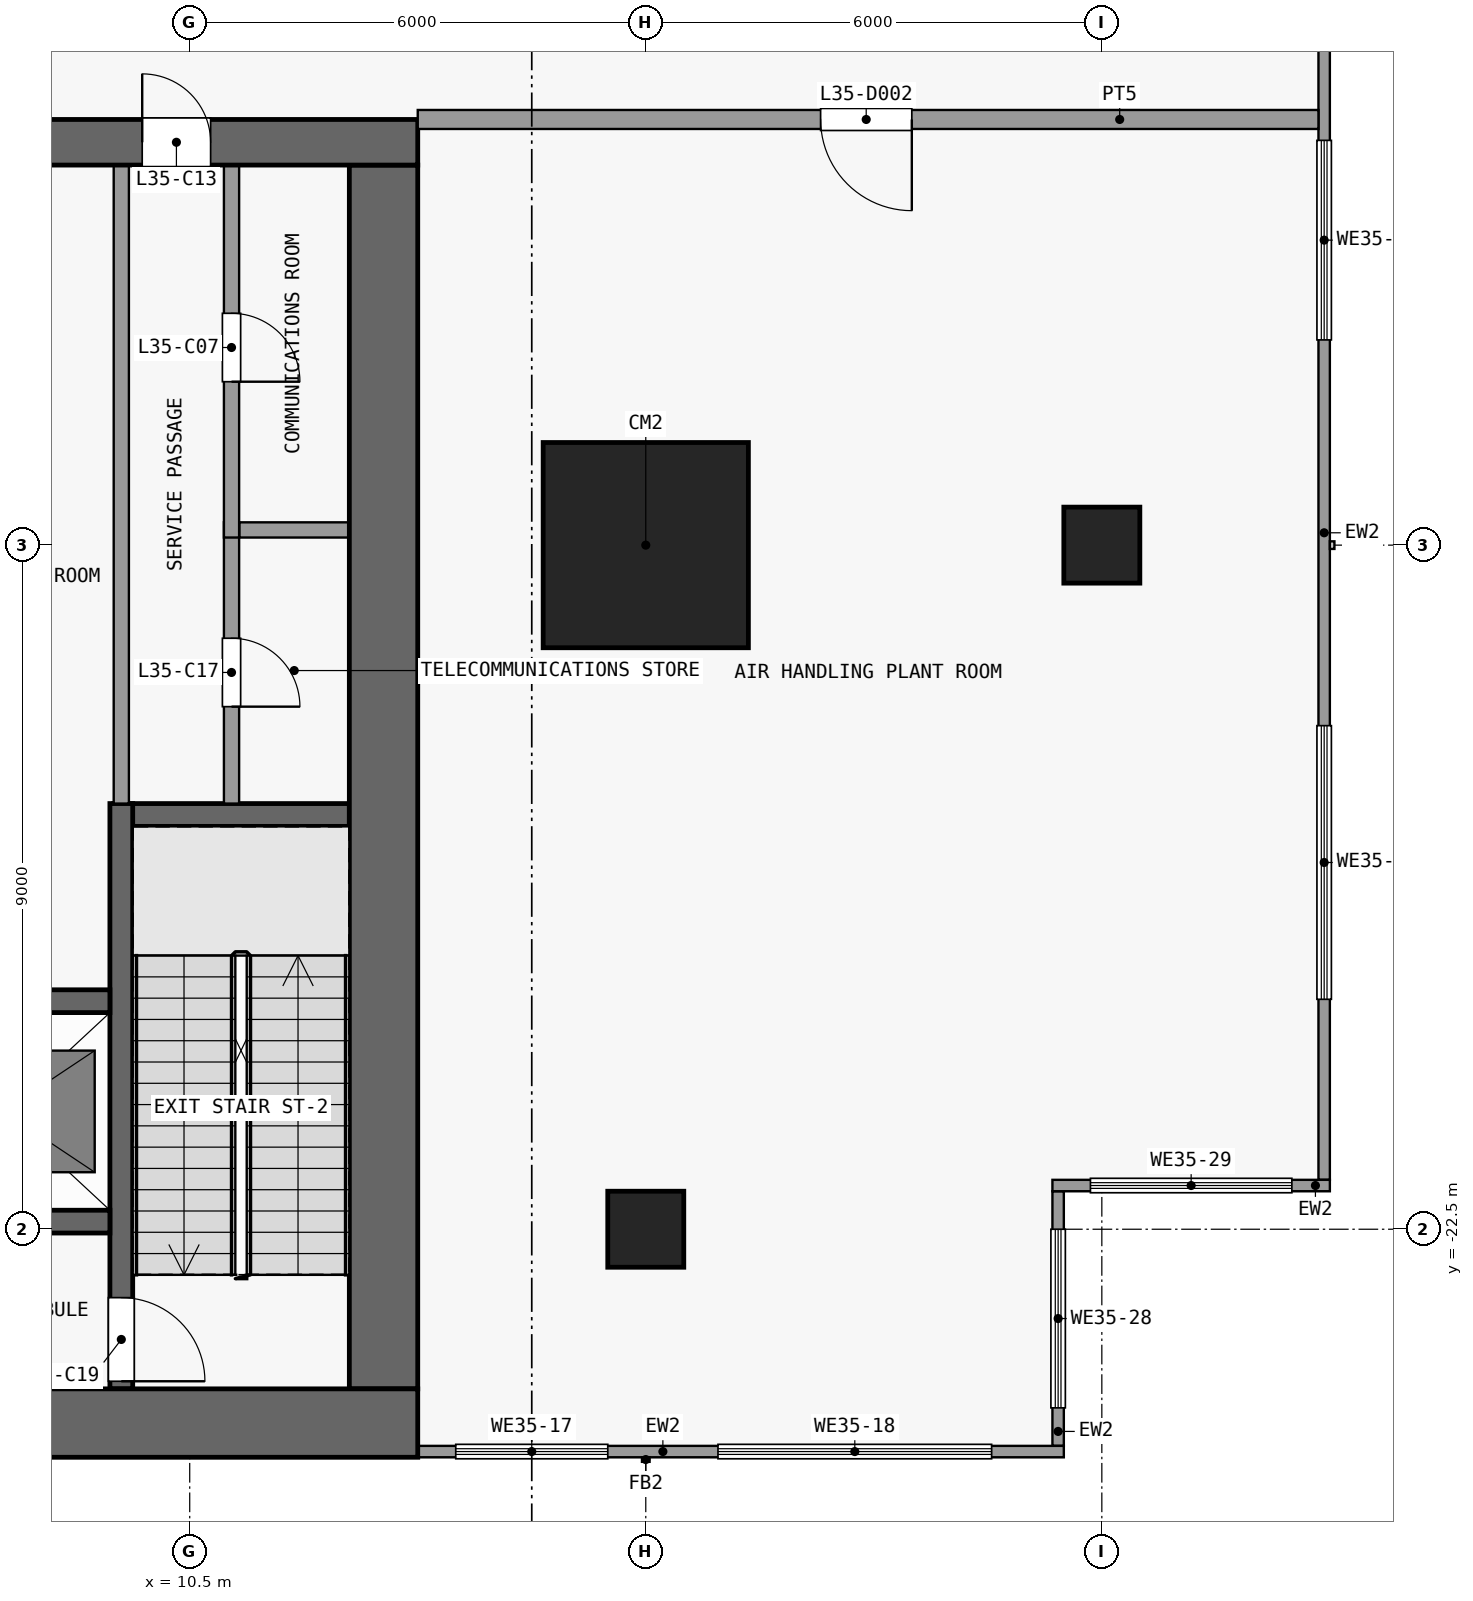
"""IFC4 building model, lengths in metres.
Left out: names, types, materials, properties, quantities, classifications, styles, units other than length and angle.
Written with IfcOpenShell. Run it as: python <this file> out.ifc"""

import sys

from ifc_helpers import new_model, si_unit, direction, frame, frame_2d, origin, origin_2d, place, context, subcontext, project, spatial, rectangle, extrude, element, fill, save


model = new_model("IFC4")
c1 = context("Model", 3, precision=1e-05, world=origin(), true_north=direction((0.0, 1.0)))
c2 = subcontext(c1, "Body", "Model", "MODEL_VIEW")
j1 = project(units=[si_unit("LENGTHUNIT", "METRE"), si_unit("PLANEANGLEUNIT", "RADIAN")], contexts=[c1])
p1 = place(None, origin())
s1 = spatial("IfcSite", under=j1, at=p1, CompositionType="ELEMENT")
p2 = place(p1, origin())
s2 = spatial("IfcBuilding", under=s1, at=p2, CompositionType="ELEMENT")
p3 = place(p2, frame((0.0, 0.0, 143.9)))
s3 = spatial("IfcBuildingStorey", under=s2, at=p3, CompositionType="ELEMENT", Elevation=143.9)
p4 = place(p3, frame((16.5, -22.5, 0.0), z_axis=(0.0, 0.0, 1.0), x_axis=(1.0, 0.0, 0.0)))
e1 = element("IfcColumn", 1, at=p4, inside=s3, PredefinedType="COLUMN", context=c2, shape_type="SweptSolid", body=[
    extrude(rectangle(XDim=1.0, YDim=1.0, at=origin_2d()), origin(), (0.0, 0.0, 1.0), 5.4),
])
p5 = place(p3, frame((16.5, -13.5, 0.0), z_axis=(0.0, 0.0, 1.0), x_axis=(1.0, 0.0, 0.0)))
e2 = element("IfcColumn", 2, at=p5, inside=s3, PredefinedType="COLUMN", context=c2, shape_type="SweptSolid", body=[
    extrude(rectangle(XDim=2.7, YDim=2.7, at=origin_2d()), origin(), (0.0, 0.0, 1.0), 5.4),
])
p6 = place(p3, frame((22.5, -13.5, 0.0), z_axis=(0.0, 0.0, 1.0), x_axis=(1.0, 0.0, 0.0)))
e3 = element("IfcColumn", 3, at=p6, inside=s3, PredefinedType="COLUMN", context=c2, shape_type="SweptSolid", body=[
    extrude(rectangle(XDim=1.0, YDim=1.0, at=origin_2d()), origin(), (0.0, 0.0, 1.0), 5.4),
])
p7 = place(p3, frame((-13.5, -25.05, 0.0), z_axis=(0.0, 0.0, 1.0), x_axis=(1.0, 0.0, 0.0)))
e4 = element("IfcWall", 4, at=p7, inside=s3, PredefinedType="SHEAR", context=c2, shape_type="SweptSolid", body=[
    extrude(rectangle(XDim=27.0, YDim=0.9, at=frame_2d((13.5, 0.0))), origin(), (0.0, 0.0, 1.0), 5.0),
])
p8 = place(p3, frame((-13.5, -8.2, 0.0), z_axis=(0.0, 0.0, 1.0), x_axis=(1.0, 0.0, 0.0)))
e5 = element("IfcWall", 5, at=p8, inside=s3, PredefinedType="SHEAR", context=c2, shape_type="SweptSolid", body=[
    extrude(rectangle(XDim=27.0, YDim=0.6, at=frame_2d((13.5, 0.0))), origin(), (0.0, 0.0, 1.0), 5.0),
])
p9 = place(p8, frame((7.8, 0.0, 0.0)))
e6 = element("IfcOpeningElement", 6, at=p9, cuts=e5, PredefinedType="OPENING", context=c2, shape_type="SweptSolid", body=[
    extrude(rectangle(XDim=1.8, YDim=2.1, at=frame_2d((0.9, 1.05))), frame((0.0, 0.31, 0.0), z_axis=(0.0, -1.0, 0.0), x_axis=(1.0, 0.0, 0.0)), (0.0, 0.0, 1.0), 0.62),
])
p10 = place(p8, frame((17.4, 0.0, 0.0)))
e7 = element("IfcOpeningElement", 7, at=p10, cuts=e5, PredefinedType="OPENING", context=c2, shape_type="SweptSolid", body=[
    extrude(rectangle(XDim=1.8, YDim=2.1, at=frame_2d((0.9, 1.05))), frame((0.0, 0.31, 0.0), z_axis=(0.0, -1.0, 0.0), x_axis=(1.0, 0.0, 0.0)), (0.0, 0.0, 1.0), 0.62),
])
p11 = place(p8, frame((2.725, 0.0, 0.0)))
e8 = element("IfcOpeningElement", 8, at=p11, cuts=e5, PredefinedType="OPENING", context=c2, shape_type="SweptSolid", body=[
    extrude(rectangle(XDim=0.9, YDim=2.1, at=frame_2d((0.45, 1.05))), frame((0.0, 0.31, 0.0), z_axis=(0.0, -1.0, 0.0), x_axis=(1.0, 0.0, 0.0)), (0.0, 0.0, 1.0), 0.62),
])
p12 = place(p8, frame((23.375, 0.0, 0.0)))
e9 = element("IfcOpeningElement", 9, at=p12, cuts=e5, PredefinedType="OPENING", context=c2, shape_type="SweptSolid", body=[
    extrude(rectangle(XDim=0.9, YDim=2.1, at=frame_2d((0.45, 1.05))), frame((0.0, 0.31, 0.0), z_axis=(0.0, -1.0, 0.0), x_axis=(1.0, 0.0, 0.0)), (0.0, 0.0, 1.0), 0.62),
])
p13 = place(p3, frame((13.05, -24.6, 0.0), z_axis=(0.0, 0.0, 1.0), x_axis=(0.0, 1.0, 0.0)))
e10 = element("IfcWall", 10, at=p13, inside=s3, PredefinedType="SHEAR", context=c2, shape_type="SweptSolid", body=[
    extrude(rectangle(XDim=16.1, YDim=0.9, at=frame_2d((8.05, 0.0))), origin(), (0.0, 0.0, 1.0), 5.0),
])
p14 = place(p3, frame((6.35, -22.4, 0.0), z_axis=(0.0, 0.0, 1.0), x_axis=(1.0, 0.0, 0.0)))
e11 = element("IfcWall", 11, at=p14, inside=s3, PredefinedType="SHEAR", context=c2, shape_type="SweptSolid", body=[
    extrude(rectangle(XDim=3.1, YDim=0.3, at=frame_2d((1.55, 0.0))), origin(), (0.0, 0.0, 1.0), 5.0),
])
p15 = place(p3, frame((6.4, -19.5, 0.0), z_axis=(0.0, 0.0, 1.0), x_axis=(1.0, 0.0, 0.0)))
e12 = element("IfcWall", 12, at=p15, inside=s3, PredefinedType="SHEAR", context=c2, shape_type="SweptSolid", body=[
    extrude(rectangle(XDim=3.05, YDim=0.3, at=frame_2d((1.525, 0.0))), origin(), (0.0, 0.0, 1.0), 5.0),
])
p16 = place(p3, frame((9.5, -17.05, 0.0), z_axis=(0.0, 0.0, 1.0), x_axis=(1.0, 0.0, 0.0)))
e13 = element("IfcWall", 13, at=p16, inside=s3, PredefinedType="SHEAR", context=c2, shape_type="SweptSolid", body=[
    extrude(rectangle(XDim=3.1, YDim=0.3, at=frame_2d((1.55, 0.0))), origin(), (0.0, 0.0, 1.0), 5.0),
])
p17 = place(p3, frame((11.15, -13.3, 0.0), z_axis=(0.0, 0.0, 1.0), x_axis=(1.0, 0.0, 0.0)))
e14 = element("IfcWall", 14, at=p17, inside=s3, PredefinedType="PARTITIONING", context=c2, shape_type="SweptSolid", body=[
    extrude(rectangle(XDim=1.45, YDim=0.2, at=frame_2d((0.725, 0.0))), origin(), (0.0, 0.0, 1.0), 5.0),
])
p18 = place(p3, frame((9.6, -16.9, 0.0), z_axis=(0.0, 0.0, 1.0), x_axis=(0.0, -1.0, 0.0)))
e15 = element("IfcWall", 15, at=p18, inside=s3, PredefinedType="SHEAR", context=c2, shape_type="SweptSolid", body=[
    extrude(rectangle(XDim=7.7, YDim=0.3, at=frame_2d((3.85, 0.0))), origin(), (0.0, 0.0, 1.0), 5.0),
])
p19 = place(p18, frame((6.5, 0.0, 0.0)))
e16 = element("IfcOpeningElement", 16, at=p19, cuts=e15, PredefinedType="OPENING", context=c2, shape_type="SweptSolid", body=[
    extrude(rectangle(XDim=1.1, YDim=2.1, at=frame_2d((0.55, 1.05))), frame((0.0, 0.16, 0.0), z_axis=(0.0, -1.0, 0.0), x_axis=(1.0, 0.0, 0.0)), (0.0, 0.0, 1.0), 0.32),
])
p20 = place(p3, frame((9.6, -16.9, 0.0), z_axis=(0.0, 0.0, 1.0), x_axis=(0.0, 1.0, 0.0)))
e17 = element("IfcWall", 17, at=p20, inside=s3, PredefinedType="PARTITIONING", context=c2, shape_type="SweptSolid", body=[
    extrude(rectangle(XDim=8.4, YDim=0.2, at=frame_2d((4.2, 0.0))), origin(), (0.0, 0.0, 1.0), 5.0),
])
p21 = place(p3, frame((11.05, -13.2, 0.0), z_axis=(0.0, 0.0, 1.0), x_axis=(0.0, -1.0, 0.0)))
e18 = element("IfcWall", 18, at=p21, inside=s3, PredefinedType="PARTITIONING", context=c2, shape_type="SweptSolid", body=[
    extrude(rectangle(XDim=3.7, YDim=0.2, at=frame_2d((1.85, 0.0))), origin(), (0.0, 0.0, 1.0), 5.0),
])
p22 = place(p21, frame((1.525, 0.0, 0.0)))
e19 = element("IfcOpeningElement", 19, at=p22, cuts=e18, PredefinedType="OPENING", context=c2, shape_type="SweptSolid", body=[
    extrude(rectangle(XDim=0.9, YDim=2.1, at=frame_2d((0.45, 1.05))), frame((0.0, 0.11, 0.0), z_axis=(0.0, -1.0, 0.0), x_axis=(1.0, 0.0, 0.0)), (0.0, 0.0, 1.0), 0.22),
])
p23 = place(p3, frame((11.05, -8.5, 0.0), z_axis=(0.0, 0.0, 1.0), x_axis=(0.0, -1.0, 0.0)))
e20 = element("IfcWall", 20, at=p23, inside=s3, PredefinedType="PARTITIONING", context=c2, shape_type="SweptSolid", body=[
    extrude(rectangle(XDim=4.9, YDim=0.2, at=frame_2d((2.45, 0.0))), origin(), (0.0, 0.0, 1.0), 5.0),
])
p24 = place(p23, frame((1.95, 0.0, 0.0)))
e21 = element("IfcOpeningElement", 21, at=p24, cuts=e20, PredefinedType="OPENING", context=c2, shape_type="SweptSolid", body=[
    extrude(rectangle(XDim=0.9, YDim=2.1, at=frame_2d((0.45, 1.05))), frame((0.0, 0.11, 0.0), z_axis=(0.0, -1.0, 0.0), x_axis=(1.0, 0.0, 0.0)), (0.0, 0.0, 1.0), 0.22),
])
p25 = place(p3, frame((25.425, 18.85, 0.0), z_axis=(0.0, 0.0, 1.0), x_axis=(0.0, -1.0, 0.0)))
e22 = element("IfcWall", 22, at=p25, inside=s3, PredefinedType="SOLIDWALL", context=c2, shape_type="SweptSolid", body=[
    extrude(rectangle(XDim=40.7, YDim=0.15, at=frame_2d((20.35, 0.0))), origin(), (0.0, 0.0, 1.0), 5.0),
])
p26 = place(p25, frame((34.725, 0.0, 1.2)))
e23 = element("IfcOpeningElement", 23, at=p26, cuts=e22, PredefinedType="OPENING", context=c2, shape_type="SweptSolid", body=[
    extrude(rectangle(XDim=3.6, YDim=3.0, at=frame_2d((1.8, 1.5))), frame((0.0, 0.085, 0.0), z_axis=(0.0, -1.0, 0.0), x_axis=(1.0, 0.0, 0.0)), (0.0, 0.0, 1.0), 0.17),
])
p27 = place(p25, frame((27.025, 0.0, 1.2)))
e24 = element("IfcOpeningElement", 24, at=p27, cuts=e22, PredefinedType="OPENING", context=c2, shape_type="SweptSolid", body=[
    extrude(rectangle(XDim=2.625, YDim=3.0, at=frame_2d((1.312, 1.5))), frame((0.0, 0.085, 0.0), z_axis=(0.0, -1.0, 0.0), x_axis=(1.0, 0.0, 0.0)), (0.0, 0.0, 1.0), 0.17),
])
p28 = place(p25, frame((18.55, 0.0, 1.2)))
e25 = element("IfcOpeningElement", 25, at=p28, cuts=e22, PredefinedType="OPENING", context=c2, shape_type="SweptSolid", body=[
    extrude(rectangle(XDim=3.6, YDim=3.0, at=frame_2d((1.8, 1.5))), frame((0.0, 0.085, 0.0), z_axis=(0.0, -1.0, 0.0), x_axis=(1.0, 0.0, 0.0)), (0.0, 0.0, 1.0), 0.17),
])
p29 = place(p25, frame((12.55, 0.0, 1.2)))
e26 = element("IfcOpeningElement", 26, at=p29, cuts=e22, PredefinedType="OPENING", context=c2, shape_type="SweptSolid", body=[
    extrude(rectangle(XDim=3.6, YDim=3.0, at=frame_2d((1.8, 1.5))), frame((0.0, 0.085, 0.0), z_axis=(0.0, -1.0, 0.0), x_axis=(1.0, 0.0, 0.0)), (0.0, 0.0, 1.0), 0.17),
])
p30 = place(p25, frame((8.625, 0.0, 1.2)))
e27 = element("IfcOpeningElement", 27, at=p30, cuts=e22, PredefinedType="OPENING", context=c2, shape_type="SweptSolid", body=[
    extrude(rectangle(XDim=1.525, YDim=3.0, at=frame_2d((0.762, 1.5))), frame((0.0, 0.085, 0.0), z_axis=(0.0, -1.0, 0.0), x_axis=(1.0, 0.0, 0.0)), (0.0, 0.0, 1.0), 0.17),
])
p31 = place(p25, frame((6.55, 0.0, 1.2)))
e28 = element("IfcOpeningElement", 28, at=p31, cuts=e22, PredefinedType="OPENING", context=c2, shape_type="SweptSolid", body=[
    extrude(rectangle(XDim=1.525, YDim=3.0, at=frame_2d((0.762, 1.5))), frame((0.0, 0.085, 0.0), z_axis=(0.0, -1.0, 0.0), x_axis=(1.0, 0.0, 0.0)), (0.0, 0.0, 1.0), 0.17),
])
p32 = place(p25, frame((0.875, 0.0, 1.2)))
e29 = element("IfcOpeningElement", 29, at=p32, cuts=e22, PredefinedType="OPENING", context=c2, shape_type="SweptSolid", body=[
    extrude(rectangle(XDim=3.6, YDim=3.0, at=frame_2d((1.8, 1.5))), frame((0.0, 0.085, 0.0), z_axis=(0.0, -1.0, 0.0), x_axis=(1.0, 0.0, 0.0)), (0.0, 0.0, 1.0), 0.17),
])
p33 = place(p3, frame((22.0, -25.425, 0.0), z_axis=(0.0, 0.0, 1.0), x_axis=(-1.0, 0.0, 0.0)))
e30 = element("IfcWall", 30, at=p33, inside=s3, PredefinedType="SOLIDWALL", context=c2, shape_type="SweptSolid", body=[
    extrude(rectangle(XDim=8.5, YDim=0.15, at=frame_2d((4.25, 0.0))), origin(), (0.0, 0.0, 1.0), 5.0),
])
p34 = place(p33, frame((6.0, 0.0, 1.2)))
e31 = element("IfcOpeningElement", 31, at=p34, cuts=e30, PredefinedType="OPENING", context=c2, shape_type="SweptSolid", body=[
    extrude(rectangle(XDim=2.0, YDim=3.0, at=frame_2d((1.0, 1.5))), frame((0.0, 0.085, 0.0), z_axis=(0.0, -1.0, 0.0), x_axis=(1.0, 0.0, 0.0)), (0.0, 0.0, 1.0), 0.17),
])
p35 = place(p33, frame((0.95, 0.0, 1.2)))
e32 = element("IfcOpeningElement", 32, at=p35, cuts=e30, PredefinedType="OPENING", context=c2, shape_type="SweptSolid", body=[
    extrude(rectangle(XDim=3.6, YDim=3.0, at=frame_2d((1.8, 1.5))), frame((0.0, 0.085, 0.0), z_axis=(0.0, -1.0, 0.0), x_axis=(1.0, 0.0, 0.0)), (0.0, 0.0, 1.0), 0.17),
])
p36 = place(p3, frame((21.925, -22.0, 0.0), z_axis=(0.0, 0.0, 1.0), x_axis=(0.0, -1.0, 0.0)))
e33 = element("IfcWall", 33, at=p36, inside=s3, PredefinedType="SOLIDWALL", context=c2, shape_type="SweptSolid", body=[
    extrude(rectangle(XDim=3.35, YDim=0.15, at=frame_2d((1.675, 0.0))), origin(), (0.0, 0.0, 1.0), 5.0),
])
p37 = place(p36, frame((0.5, 0.0, 1.2)))
e34 = element("IfcOpeningElement", 34, at=p37, cuts=e33, PredefinedType="OPENING", context=c2, shape_type="SweptSolid", body=[
    extrude(rectangle(XDim=2.35, YDim=3.0, at=frame_2d((1.175, 1.5))), frame((0.0, 0.085, 0.0), z_axis=(0.0, -1.0, 0.0), x_axis=(1.0, 0.0, 0.0)), (0.0, 0.0, 1.0), 0.17),
])
p38 = place(p3, frame((25.5, -21.925, 0.0), z_axis=(0.0, 0.0, 1.0), x_axis=(-1.0, 0.0, 0.0)))
e35 = element("IfcWall", 35, at=p38, inside=s3, PredefinedType="SOLIDWALL", context=c2, shape_type="SweptSolid", body=[
    extrude(rectangle(XDim=3.65, YDim=0.15, at=frame_2d((1.825, 0.0))), origin(), (0.0, 0.0, 1.0), 5.0),
])
p39 = place(p38, frame((0.5, 0.0, 1.2)))
e36 = element("IfcOpeningElement", 36, at=p39, cuts=e35, PredefinedType="OPENING", context=c2, shape_type="SweptSolid", body=[
    extrude(rectangle(XDim=2.65, YDim=3.0, at=frame_2d((1.325, 1.5))), frame((0.0, 0.085, 0.0), z_axis=(0.0, -1.0, 0.0), x_axis=(1.0, 0.0, 0.0)), (0.0, 0.0, 1.0), 0.17),
])
p40 = place(p3, frame((13.5, -7.9, 0.0), z_axis=(0.0, 0.0, 1.0), x_axis=(1.0, 0.0, 0.0)))
e37 = element("IfcWall", 37, at=p40, inside=s3, PredefinedType="PARTITIONING", context=c2, shape_type="SweptSolid", body=[
    extrude(rectangle(XDim=11.85, YDim=0.25, at=frame_2d((5.925, 0.0))), origin(), (0.0, 0.0, 1.0), 5.0),
])
p41 = place(p40, frame((5.3, 0.0, 0.0)))
e38 = element("IfcOpeningElement", 38, at=p41, cuts=e37, PredefinedType="OPENING", context=c2, shape_type="SweptSolid", body=[
    extrude(rectangle(XDim=1.2, YDim=2.1, at=frame_2d((0.6, 1.05))), frame((0.0, 0.135, 0.0), z_axis=(0.0, -1.0, 0.0), x_axis=(1.0, 0.0, 0.0)), (0.0, 0.0, 1.0), 0.27),
])
p42 = place(p24, origin())
e39 = element("IfcDoor", 39, at=p42, inside=s3, OperationType="SINGLE_SWING_RIGHT", PredefinedType="DOOR", context=c2, shape_type="SweptSolid", body=[
    extrude(rectangle(XDim=0.9, YDim=2.1, at=frame_2d((0.45, 1.05))), frame((0.0, 0.025, 0.0), z_axis=(0.0, -1.0, 0.0), x_axis=(1.0, 0.0, 0.0)), (0.0, 0.0, 1.0), 0.05),
])
fill(e21, e39)
p43 = place(p12, origin())
e40 = element("IfcDoor", 40, at=p43, inside=s3, OperationType="SINGLE_SWING_LEFT", PredefinedType="DOOR", context=c2, shape_type="SweptSolid", body=[
    extrude(rectangle(XDim=0.9, YDim=2.1, at=frame_2d((0.45, 1.05))), frame((0.0, 0.025, 0.0), z_axis=(0.0, -1.0, 0.0), x_axis=(1.0, 0.0, 0.0)), (0.0, 0.0, 1.0), 0.05),
])
fill(e9, e40)
p44 = place(p22, origin())
e41 = element("IfcDoor", 41, at=p44, inside=s3, OperationType="SINGLE_SWING_RIGHT", PredefinedType="DOOR", context=c2, shape_type="SweptSolid", body=[
    extrude(rectangle(XDim=0.9, YDim=2.1, at=frame_2d((0.45, 1.05))), frame((0.0, 0.025, 0.0), z_axis=(0.0, -1.0, 0.0), x_axis=(1.0, 0.0, 0.0)), (0.0, 0.0, 1.0), 0.05),
])
fill(e19, e41)
p45 = place(p19, origin())
e42 = element("IfcDoor", 42, at=p45, inside=s3, OperationType="SINGLE_SWING_RIGHT", PredefinedType="DOOR", context=c2, shape_type="SweptSolid", body=[
    extrude(rectangle(XDim=1.1, YDim=2.1, at=frame_2d((0.55, 1.05))), frame((0.0, 0.025, 0.0), z_axis=(0.0, -1.0, 0.0), x_axis=(1.0, 0.0, 0.0)), (0.0, 0.0, 1.0), 0.05),
])
fill(e16, e42)
p46 = place(p26, origin())
e43 = element("IfcWindow", 43, at=p46, inside=s3, PartitioningType="SINGLE_PANEL", PredefinedType="WINDOW", context=c2, shape_type="SweptSolid", body=[
    extrude(rectangle(XDim=3.6, YDim=3.0, at=frame_2d((1.8, 1.5))), frame((0.0, 0.03, 0.0), z_axis=(0.0, -1.0, 0.0), x_axis=(1.0, 0.0, 0.0)), (0.0, 0.0, 1.0), 0.06),
])
fill(e23, e43)
p47 = place(p27, origin())
e44 = element("IfcWindow", 44, at=p47, inside=s3, PartitioningType="SINGLE_PANEL", PredefinedType="WINDOW", context=c2, shape_type="SweptSolid", body=[
    extrude(rectangle(XDim=2.625, YDim=3.0, at=frame_2d((1.312, 1.5))), frame((0.0, 0.03, 0.0), z_axis=(0.0, -1.0, 0.0), x_axis=(1.0, 0.0, 0.0)), (0.0, 0.0, 1.0), 0.06),
])
fill(e24, e44)
p48 = place(p34, origin())
e45 = element("IfcWindow", 45, at=p48, inside=s3, PartitioningType="SINGLE_PANEL", PredefinedType="WINDOW", context=c2, shape_type="SweptSolid", body=[
    extrude(rectangle(XDim=2.0, YDim=3.0, at=frame_2d((1.0, 1.5))), frame((0.0, 0.03, 0.0), z_axis=(0.0, -1.0, 0.0), x_axis=(1.0, 0.0, 0.0)), (0.0, 0.0, 1.0), 0.06),
])
fill(e31, e45)
p49 = place(p35, origin())
e46 = element("IfcWindow", 46, at=p49, inside=s3, PartitioningType="SINGLE_PANEL", PredefinedType="WINDOW", context=c2, shape_type="SweptSolid", body=[
    extrude(rectangle(XDim=3.6, YDim=3.0, at=frame_2d((1.8, 1.5))), frame((0.0, 0.03, 0.0), z_axis=(0.0, -1.0, 0.0), x_axis=(1.0, 0.0, 0.0)), (0.0, 0.0, 1.0), 0.06),
])
fill(e32, e46)
p50 = place(p37, origin())
e47 = element("IfcWindow", 47, at=p50, inside=s3, PartitioningType="SINGLE_PANEL", PredefinedType="WINDOW", context=c2, shape_type="SweptSolid", body=[
    extrude(rectangle(XDim=2.35, YDim=3.0, at=frame_2d((1.175, 1.5))), frame((0.0, 0.03, 0.0), z_axis=(0.0, -1.0, 0.0), x_axis=(1.0, 0.0, 0.0)), (0.0, 0.0, 1.0), 0.06),
])
fill(e34, e47)
p51 = place(p39, origin())
e48 = element("IfcWindow", 48, at=p51, inside=s3, PartitioningType="SINGLE_PANEL", PredefinedType="WINDOW", context=c2, shape_type="SweptSolid", body=[
    extrude(rectangle(XDim=2.65, YDim=3.0, at=frame_2d((1.325, 1.5))), frame((0.0, 0.03, 0.0), z_axis=(0.0, -1.0, 0.0), x_axis=(1.0, 0.0, 0.0)), (0.0, 0.0, 1.0), 0.06),
])
fill(e36, e48)
p52 = place(p41, origin())
e49 = element("IfcDoor", 49, at=p52, inside=s3, OperationType="SINGLE_SWING_RIGHT", PredefinedType="DOOR", context=c2, shape_type="SweptSolid", body=[
    extrude(rectangle(XDim=1.2, YDim=2.1, at=frame_2d((0.6, 1.05))), frame((0.0, 0.025, 0.0), z_axis=(0.0, -1.0, 0.0), x_axis=(1.0, 0.0, 0.0)), (0.0, 0.0, 1.0), 0.05),
])
fill(e38, e49)
save(model, sys.argv[1])
